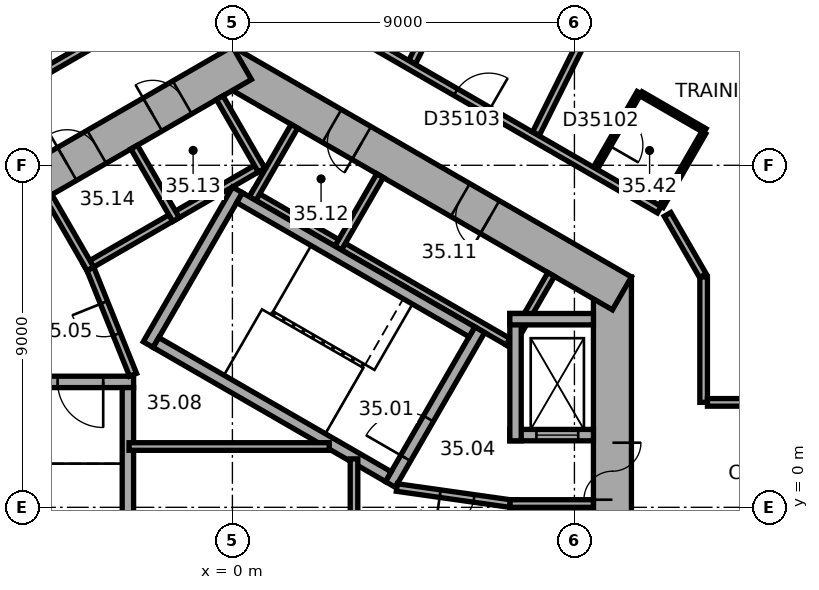
"""IFC4 building model, lengths in metres.
Left out: names, types, materials, properties, quantities, classifications, styles, units other than length and angle.
Written with IfcOpenShell. Run it as: python <this file> out.ifc"""

import sys

from ifc_helpers import new_model, si_unit, direction, frame, frame_2d, origin, place, context, subcontext, project, spatial, rectangle, extrude, element, fill, save


model = new_model("IFC4")
c1 = context("Model", 3, precision=1e-05, world=origin(), true_north=direction((0.0, 1.0)))
c2 = subcontext(c1, "Body", "Model", "MODEL_VIEW")
j1 = project(units=[si_unit("LENGTHUNIT", "METRE"), si_unit("PLANEANGLEUNIT", "RADIAN")], contexts=[c1])
p1 = place(None, origin())
s1 = spatial("IfcSite", under=j1, at=p1, CompositionType="ELEMENT")
p2 = place(p1, origin())
s2 = spatial("IfcBuilding", under=s1, at=p2, CompositionType="ELEMENT")
p3 = place(p2, frame((0.0, 0.0, 146.6)))
s3 = spatial("IfcBuildingStorey", under=s2, at=p3, CompositionType="ELEMENT", Elevation=146.6)
p4 = place(p3, frame((10.0, -6.062, 0.0), z_axis=(0.0, 0.0, 1.0), x_axis=(0.0, 1.0, 0.0)))
e1 = element("IfcWall", 1, at=p4, inside=s3, PredefinedType="SHEAR", context=c2, shape_type="SweptSolid", body=[
    extrude(rectangle(XDim=12.125, YDim=1.0, at=frame_2d((6.062, 0.0))), origin(), (0.0, 0.0, 1.0), 3.7),
])
p5 = place(p4, frame((6.262, 0.0, 0.0)))
e2 = element("IfcOpeningElement", 2, at=p5, cuts=e1, PredefinedType="OPENING", context=c2, shape_type="SweptSolid", body=[
    extrude(rectangle(XDim=1.5, YDim=2.1, at=frame_2d((0.75, 1.05))), frame((0.0, 0.51, 0.0), z_axis=(0.0, -1.0, 0.0), x_axis=(1.0, 0.0, 0.0)), (0.0, 0.0, 1.0), 1.02),
])
p6 = place(p4, frame((3.112, 0.0, 0.0)))
e3 = element("IfcOpeningElement", 3, at=p6, cuts=e1, PredefinedType="OPENING", context=c2, shape_type="SweptSolid", body=[
    extrude(rectangle(XDim=0.9, YDim=2.1, at=frame_2d((0.45, 1.05))), frame((0.0, 0.51, 0.0), z_axis=(0.0, -1.0, 0.0), x_axis=(1.0, 0.0, 0.0)), (0.0, 0.0, 1.0), 1.02),
])
p7 = place(p3, frame((10.25, 5.629, 0.0), z_axis=(0.0, 0.0, 1.0), x_axis=(-0.866022616891, 0.50000482701, 0.0)))
e4 = element("IfcWall", 4, at=p7, inside=s3, PredefinedType="SHEAR", context=c2, shape_type="SweptSolid", body=[
    extrude(rectangle(XDim=12.125, YDim=1.0, at=frame_2d((6.062, 0.0))), origin(), (0.0, 0.0, 1.0), 3.7),
])
p8 = place(p7, frame((4.012, 0.0, 0.0)))
e5 = element("IfcOpeningElement", 5, at=p8, cuts=e4, PredefinedType="OPENING", context=c2, shape_type="SweptSolid", body=[
    extrude(rectangle(XDim=0.9, YDim=2.1, at=frame_2d((0.45, 1.05))), frame((0.0, 0.51, 0.0), z_axis=(0.0, -1.0, 0.0), x_axis=(1.0, 0.0, 0.0)), (0.0, 0.0, 1.0), 1.02),
])
p9 = place(p7, frame((7.912, 0.0, 0.0)))
e6 = element("IfcOpeningElement", 6, at=p9, cuts=e4, PredefinedType="OPENING", context=c2, shape_type="SweptSolid", body=[
    extrude(rectangle(XDim=0.9, YDim=2.1, at=frame_2d((0.45, 1.05))), frame((0.0, 0.51, 0.0), z_axis=(0.0, -1.0, 0.0), x_axis=(1.0, 0.0, 0.0)), (0.0, 0.0, 1.0), 1.02),
])
p10 = place(p3, frame((0.25, 11.691, 0.0), z_axis=(0.0, 0.0, 1.0), x_axis=(-0.866022616891, -0.50000482701, 0.0)))
e7 = element("IfcWall", 7, at=p10, inside=s3, PredefinedType="SHEAR", context=c2, shape_type="SweptSolid", body=[
    extrude(rectangle(XDim=12.125, YDim=1.0, at=frame_2d((6.062, 0.0))), origin(), (0.0, 0.0, 1.0), 3.7),
])
p11 = place(p10, frame((6.262, 0.0, 0.0)))
e8 = element("IfcOpeningElement", 8, at=p11, cuts=e7, PredefinedType="OPENING", context=c2, shape_type="SweptSolid", body=[
    extrude(rectangle(XDim=1.5, YDim=2.1, at=frame_2d((0.75, 1.05))), frame((0.0, 0.51, 0.0), z_axis=(0.0, -1.0, 0.0), x_axis=(1.0, 0.0, 0.0)), (0.0, 0.0, 1.0), 1.02),
])
p12 = place(p10, frame((1.812, 0.0, 0.0)))
e9 = element("IfcOpeningElement", 9, at=p12, cuts=e7, PredefinedType="OPENING", context=c2, shape_type="SweptSolid", body=[
    extrude(rectangle(XDim=0.9, YDim=2.1, at=frame_2d((0.45, 1.05))), frame((0.0, 0.51, 0.0), z_axis=(0.0, -1.0, 0.0), x_axis=(1.0, 0.0, 0.0)), (0.0, 0.0, 1.0), 1.02),
])
p13 = place(p10, frame((4.412, 0.0, 0.0)))
e10 = element("IfcOpeningElement", 10, at=p13, cuts=e7, PredefinedType="OPENING", context=c2, shape_type="SweptSolid", body=[
    extrude(rectangle(XDim=0.9, YDim=2.1, at=frame_2d((0.45, 1.05))), frame((0.0, 0.51, 0.0), z_axis=(0.0, -1.0, 0.0), x_axis=(1.0, 0.0, 0.0)), (0.0, 0.0, 1.0), 1.02),
])
p14 = place(p3, frame((7.4, -5.2, 0.0), z_axis=(0.0, 0.0, 1.0), x_axis=(0.0, 1.0, 0.0)))
e11 = element("IfcWall", 11, at=p14, inside=s3, PredefinedType="PARTITIONING", context=c2, shape_type="SweptSolid", body=[
    extrude(rectangle(XDim=5.4, YDim=0.2, at=frame_2d((2.7, 0.0))), origin(), (0.0, 0.0, 1.0), 3.42),
])
p15 = place(p3, frame((7.3, 0.1, 0.0), z_axis=(0.0, 0.0, 1.0), x_axis=(1.0, 0.0, 0.0)))
e12 = element("IfcWall", 12, at=p15, inside=s3, PredefinedType="PARTITIONING", context=c2, shape_type="SweptSolid", body=[
    extrude(rectangle(XDim=2.2, YDim=0.2, at=frame_2d((1.1, 0.0))), origin(), (0.0, 0.0, 1.0), 3.42),
])
p16 = place(p3, frame((7.424, 4.259, 0.0), z_axis=(0.0, 0.0, 1.0), x_axis=(-0.866026010844, 0.49999894854, 0.0)))
e13 = element("IfcWall", 13, at=p16, inside=s3, PredefinedType="PARTITIONING", context=c2, shape_type="SweptSolid", body=[
    extrude(rectangle(XDim=8.0, YDim=0.2, at=frame_2d((4.0, 0.0))), origin(), (0.0, 0.0, 1.0), 3.42),
])
for number, where, z_axis, x_axis in (
    (14, (7.287, 4.222, 0.0), (0.0, 0.0, 1.0), (0.5, 0.866, 0.0)),
    (15, (2.784, 6.822, 0.0), (0.0, 0.0, 1.0), (0.5, 0.866, 0.0)),
    (16, (0.532, 8.122, 0.0), (0.0, 0.0, 1.0), (0.5, 0.866, 0.0)),
):
    element("IfcWall", number, at=place(p3, frame(where, z_axis=z_axis, x_axis=x_axis)), inside=s3, PredefinedType="PARTITIONING", context=c2, shape_type="SweptSolid", body=[
        extrude(rectangle(XDim=2.2, YDim=0.2, at=frame_2d((1.1, 0.0))), origin(), (0.0, 0.0, 1.0), 3.42),
    ])
p17 = place(p3, frame((0.803, 9.009, 0.0), z_axis=(0.0, 0.0, 1.0), x_axis=(-0.866028230842, -0.499995103361, 0.0)))
e17 = element("IfcWall", 17, at=p17, inside=s3, PredefinedType="PARTITIONING", context=c2, shape_type="SweptSolid", body=[
    extrude(rectangle(XDim=5.4, YDim=0.2, at=frame_2d((2.7, 0.0))), origin(), (0.0, 0.0, 1.0), 3.42),
])
p18 = place(p3, frame((0.767, 8.872, 0.0), z_axis=(0.0, 0.0, 1.0), x_axis=(-0.499994660107, 0.866028486751, 0.0)))
e18 = element("IfcWall", 18, at=p18, inside=s3, PredefinedType="PARTITIONING", context=c2, shape_type="SweptSolid", body=[
    extrude(rectangle(XDim=2.2, YDim=0.2, at=frame_2d((1.1, 0.0))), origin(), (0.0, 0.0, 1.0), 3.42),
])
for number, where, z_axis, x_axis in (
    (19, (-1.485, 7.572, 0.0), (0.0, 0.0, 1.0), (-0.5, 0.866, 0.0)),
    (20, (-3.737, 6.272, 0.0), (0.0, 0.0, 1.0), (-0.5, 0.866, 0.0)),
):
    element("IfcWall", number, at=place(p3, frame(where, z_axis=z_axis, x_axis=x_axis)), inside=s3, PredefinedType="PARTITIONING", context=c2, shape_type="SweptSolid", body=[
        extrude(rectangle(XDim=2.2, YDim=0.2, at=frame_2d((1.1, 0.0))), origin(), (0.0, 0.0, 1.0), 3.42),
    ])
p19 = place(p3, frame((4.158, 0.602, 0.0), z_axis=(0.0, 0.0, 1.0), x_axis=(0.499977259774, 0.866038532462, 0.0)))
e21 = element("IfcWall", 21, at=p19, inside=s3, PredefinedType="SHEAR", context=c2, shape_type="SweptSolid", body=[
    extrude(rectangle(XDim=4.7, YDim=0.3, at=frame_2d((2.35, 0.0))), origin(), (0.0, 0.0, 1.0), 3.42),
])
p20 = place(p19, frame((0.8, 0.0, 0.0)))
e22 = element("IfcOpeningElement", 22, at=p20, cuts=e21, PredefinedType="OPENING", context=c2, shape_type="SweptSolid", body=[
    extrude(rectangle(XDim=1.2, YDim=2.1, at=frame_2d((0.6, 1.05))), frame((0.0, 0.16, 0.0), z_axis=(0.0, -1.0, 0.0), x_axis=(1.0, 0.0, 0.0)), (0.0, 0.0, 1.0), 0.32),
])
p21 = place(p3, frame((-2.216, 4.282, 0.0), z_axis=(0.0, 0.0, 1.0), x_axis=(0.499977259774, 0.866038532462, 0.0)))
e23 = element("IfcWall", 23, at=p21, inside=s3, PredefinedType="SHEAR", context=c2, shape_type="SweptSolid", body=[
    extrude(rectangle(XDim=4.7, YDim=0.3, at=frame_2d((2.35, 0.0))), origin(), (0.0, 0.0, 1.0), 3.42),
])
for number, where, z_axis, x_axis in (
    (24, (4.103, 0.807, 0.0), (0.0, 0.0, 1.0), (-0.866, 0.5, 0.0)),
    (25, (6.303, 4.617, 0.0), (0.0, 0.0, 1.0), (-0.866, 0.5, 0.0)),
):
    element("IfcWall", number, at=place(p3, frame(where, z_axis=z_axis, x_axis=x_axis)), inside=s3, PredefinedType="SHEAR", context=c2, shape_type="SweptSolid", body=[
        extrude(rectangle(XDim=7.06, YDim=0.3, at=frame_2d((3.53, 0.0))), origin(), (0.0, 0.0, 1.0), 3.42),
    ])
p22 = place(p3, frame((-2.6, 3.3, 0.0), z_axis=(0.0, 0.0, 1.0), x_axis=(-1.0, 0.0, 0.0)))
e26 = element("IfcWall", 26, at=p22, inside=s3, PredefinedType="SHEAR", context=c2, shape_type="SweptSolid", body=[
    extrude(rectangle(XDim=4.7, YDim=0.3, at=frame_2d((2.35, 0.0))), origin(), (0.0, 0.0, 1.0), 3.42),
])
p23 = place(p22, frame((0.8, 0.0, 0.0)))
e27 = element("IfcOpeningElement", 27, at=p23, cuts=e26, PredefinedType="OPENING", context=c2, shape_type="SweptSolid", body=[
    extrude(rectangle(XDim=1.2, YDim=2.1, at=frame_2d((0.6, 1.05))), frame((0.0, 0.16, 0.0), z_axis=(0.0, -1.0, 0.0), x_axis=(1.0, 0.0, 0.0)), (0.0, 0.0, 1.0), 0.32),
])
p24 = place(p3, frame((-2.75, 3.15, 0.0), z_axis=(0.0, 0.0, 1.0), x_axis=(0.0, -1.0, 0.0)))
e28 = element("IfcWall", 28, at=p24, inside=s3, PredefinedType="SHEAR", context=c2, shape_type="SweptSolid", body=[
    extrude(rectangle(XDim=7.06, YDim=0.3, at=frame_2d((3.53, 0.0))), origin(), (0.0, 0.0, 1.0), 3.42),
])
p25 = place(p3, frame((7.3, 1.9, 0.0), z_axis=(0.0, 0.0, 1.0), x_axis=(1.0, 0.0, 0.0)))
e29 = element("IfcWall", 29, at=p25, inside=s3, PredefinedType="SHEAR", context=c2, shape_type="SweptSolid", body=[
    extrude(rectangle(XDim=2.2, YDim=0.3, at=frame_2d((1.1, 0.0))), origin(), (0.0, 0.0, 1.0), 3.42),
])
p26 = place(p25, frame((0.7, 0.0, 0.0)))
e30 = element("IfcOpeningElement", 30, at=p26, cuts=e29, PredefinedType="OPENING", context=c2, shape_type="SweptSolid", body=[
    extrude(rectangle(XDim=1.1, YDim=2.1, at=frame_2d((0.55, 1.05))), frame((0.0, 0.16, 0.0), z_axis=(0.0, -1.0, 0.0), x_axis=(1.0, 0.0, 0.0)), (0.0, 0.0, 1.0), 0.32),
])
p27 = place(p3, frame((7.45, 1.75, 0.0), z_axis=(0.0, 0.0, 1.0), x_axis=(0.0, 1.0, 0.0)))
e31 = element("IfcWall", 31, at=p27, inside=s3, PredefinedType="SHEAR", context=c2, shape_type="SweptSolid", body=[
    extrude(rectangle(XDim=3.35, YDim=0.3, at=frame_2d((1.675, 0.0))), origin(), (0.0, 0.0, 1.0), 3.42),
])
p28 = place(p3, frame((7.3, 4.95, 0.0), z_axis=(0.0, 0.0, 1.0), x_axis=(1.0, 0.0, 0.0)))
e32 = element("IfcWall", 32, at=p28, inside=s3, PredefinedType="SHEAR", context=c2, shape_type="SweptSolid", body=[
    extrude(rectangle(XDim=2.2, YDim=0.3, at=frame_2d((1.1, 0.0))), origin(), (0.0, 0.0, 1.0), 3.42),
])
p29 = place(p3, frame((4.327, 0.521, 0.0), z_axis=(0.0, 0.0, 1.0), x_axis=(0.990124376366, -0.14019172346, 0.0)))
e33 = element("IfcWall", 33, at=p29, inside=s3, PredefinedType="PARTITIONING", context=c2, shape_type="SweptSolid", body=[
    extrude(rectangle(XDim=3.002, YDim=0.2, at=frame_2d((1.501, 0.0))), origin(), (0.0, 0.0, 1.0), 3.42),
])
p30 = place(p29, frame((1.15, 0.0, 0.0)))
e34 = element("IfcOpeningElement", 34, at=p30, cuts=e33, PredefinedType="OPENING", context=c2, shape_type="SweptSolid", body=[
    extrude(rectangle(XDim=0.9, YDim=2.1, at=frame_2d((0.45, 1.05))), frame((0.0, 0.11, 0.0), z_axis=(0.0, -1.0, 0.0), x_axis=(1.0, 0.0, 0.0)), (0.0, 0.0, 1.0), 0.22),
])
p31 = place(p3, frame((-2.615, 3.487, 0.0), z_axis=(0.0, 0.0, 1.0), x_axis=(-0.373576831041, 0.92759924068, 0.0)))
e35 = element("IfcWall", 35, at=p31, inside=s3, PredefinedType="PARTITIONING", context=c2, shape_type="SweptSolid", body=[
    extrude(rectangle(XDim=3.002, YDim=0.2, at=frame_2d((1.501, 0.0))), origin(), (0.0, 0.0, 1.0), 3.42),
])
p32 = place(p31, frame((1.15, 0.0, 0.0)))
e36 = element("IfcOpeningElement", 36, at=p32, cuts=e35, PredefinedType="OPENING", context=c2, shape_type="SweptSolid", body=[
    extrude(rectangle(XDim=0.9, YDim=2.1, at=frame_2d((0.45, 1.05))), frame((0.0, 0.11, 0.0), z_axis=(0.0, -1.0, 0.0), x_axis=(1.0, 0.0, 0.0)), (0.0, 0.0, 1.0), 0.22),
])
p33 = place(p3, frame((-2.72, 1.6, 0.0), z_axis=(0.0, 0.0, 1.0), x_axis=(1.0, 0.0, 0.0)))
e37 = element("IfcWall", 37, at=p33, inside=s3, PredefinedType="PARTITIONING", context=c2, shape_type="SweptSolid", body=[
    extrude(rectangle(XDim=5.269, YDim=0.2, at=frame_2d((2.634, 0.0))), origin(), (0.0, 0.0, 1.0), 3.42),
])
p34 = place(p3, frame((3.2, -1.275, 0.0), z_axis=(0.0, 0.0, 1.0), x_axis=(0.0, 1.0, 0.0)))
e38 = element("IfcWall", 38, at=p34, inside=s3, PredefinedType="PARTITIONING", context=c2, shape_type="SweptSolid", body=[
    extrude(rectangle(XDim=2.549, YDim=0.2, at=frame_2d((1.275, 0.0))), origin(), (0.0, 0.0, 1.0), 3.42),
])
p35 = place(p3, frame((-1.167, 13.645, 0.0), z_axis=(0.0, 0.0, 1.0), x_axis=(-0.866034830959, -0.499983671299, 0.0)))
e39 = element("IfcWall", 39, at=p35, inside=s3, PredefinedType="PARTITIONING", context=c2, shape_type="SweptSolid", body=[
    extrude(rectangle(XDim=4.719, YDim=0.2, at=frame_2d((2.36, 0.0))), origin(), (0.0, 0.0, 1.0), 3.42),
])
p36 = place(p3, frame((8.37, 19.013, 0.0), z_axis=(0.0, 0.0, 1.0), x_axis=(-0.446183598632, -0.894941448538, 0.0)))
e40 = element("IfcWall", 40, at=p36, inside=s3, PredefinedType="PARTITIONING", context=c2, shape_type="SweptSolid", body=[
    extrude(rectangle(XDim=8.156, YDim=0.2, at=frame_2d((4.078, 0.0))), origin(), (0.0, 0.0, 1.0), 3.42),
])
p37 = place(p3, frame((9.552, 8.919, 0.0), z_axis=(0.0, 0.0, 1.0), x_axis=(0.499952165731, 0.866053019151, 0.0)))
e41 = element("IfcWall", 41, at=p37, inside=s3, PredefinedType="PARTITIONING", context=c2, shape_type="SweptSolid", body=[
    extrude(rectangle(XDim=2.3, YDim=0.12, at=frame_2d((1.15, 0.0))), origin(), (0.0, 0.0, 1.0), 3.42),
])
p38 = place(p37, frame((0.7, 0.0, 0.0)))
e42 = element("IfcOpeningElement", 42, at=p38, cuts=e41, PredefinedType="OPENING", context=c2, shape_type="SweptSolid", body=[
    extrude(rectangle(XDim=0.9, YDim=2.1, at=frame_2d((0.45, 1.05))), frame((0.0, 0.07, 0.0), z_axis=(0.0, -1.0, 0.0), x_axis=(1.0, 0.0, 0.0)), (0.0, 0.0, 1.0), 0.14),
])
p39 = place(p3, frame((10.753, 10.881, 0.0), z_axis=(0.0, 0.0, 1.0), x_axis=(0.866043088465, -0.499969367985, 0.0)))
e43 = element("IfcWall", 43, at=p39, inside=s3, PredefinedType="PARTITIONING", context=c2, shape_type="SweptSolid", body=[
    extrude(rectangle(XDim=1.94, YDim=0.12, at=frame_2d((0.97, 0.0))), origin(), (0.0, 0.0, 1.0), 3.42),
])
p40 = place(p3, frame((11.233, 7.833, 0.0), z_axis=(0.0, 0.0, 1.0), x_axis=(-0.866021713988, 0.50000639086, 0.0)))
e44 = element("IfcWall", 44, at=p40, inside=s3, PredefinedType="PARTITIONING", context=c2, shape_type="SweptSolid", body=[
    extrude(rectangle(XDim=11.834, YDim=0.2, at=frame_2d((5.917, 0.0))), origin(), (0.0, 0.0, 1.0), 3.42),
])
p41 = place(p40, frame((5.185, 0.0, 0.0)))
e45 = element("IfcOpeningElement", 45, at=p41, cuts=e44, PredefinedType="OPENING", context=c2, shape_type="SweptSolid", body=[
    extrude(rectangle(XDim=1.0, YDim=2.1, at=frame_2d((0.5, 1.05))), frame((0.0, 0.11, 0.0), z_axis=(0.0, -1.0, 0.0), x_axis=(1.0, 0.0, 0.0)), (0.0, 0.0, 1.0), 0.22),
])
p42 = place(p3, frame((11.73, 17.338, 0.0), z_axis=(0.0, 0.0, 1.0), x_axis=(-0.446165200553, -0.894950620881, 0.0)))
e46 = element("IfcWall", 46, at=p42, inside=s3, PredefinedType="PARTITIONING", context=c2, shape_type="SweptSolid", body=[
    extrude(rectangle(XDim=8.386, YDim=0.2, at=frame_2d((4.193, 0.0))), origin(), (0.0, 0.0, 1.0), 2.87),
])
p43 = place(p3, frame((12.38, 6.097, 0.0), z_axis=(0.0, 0.0, 1.0), x_axis=(-0.499964847546, 0.866045698112, 0.0)))
e47 = element("IfcWall", 47, at=p43, inside=s3, PredefinedType="PARTITIONING", context=c2, shape_type="SweptSolid", body=[
    extrude(rectangle(XDim=1.86, YDim=0.2, at=frame_2d((0.93, 0.0))), origin(), (0.0, 0.0, 1.0), 3.42),
])
p44 = place(p3, frame((12.4, 2.761, 0.0), z_axis=(0.0, 0.0, 1.0), x_axis=(0.0, 1.0, 0.0)))
e48 = element("IfcWall", 48, at=p44, inside=s3, PredefinedType="PARTITIONING", context=c2, shape_type="SweptSolid", body=[
    extrude(rectangle(XDim=3.301, YDim=0.2, at=frame_2d((1.65, 0.0))), origin(), (0.0, 0.0, 1.0), 3.42),
])
p45 = place(p3, frame((12.404, 9.859, 0.0), z_axis=(0.0, 0.0, 1.0), x_axis=(-0.500030632641, -0.866007717299, 0.0)))
e49 = element("IfcWall", 49, at=p45, inside=s3, PredefinedType="PARTITIONING", context=c2, shape_type="SweptSolid", body=[
    extrude(rectangle(XDim=2.24, YDim=0.12, at=frame_2d((1.12, 0.0))), origin(), (0.0, 0.0, 1.0), 3.42),
])
p46 = place(p3, frame((20.75, 2.761, 0.0), z_axis=(0.0, 0.0, 1.0), x_axis=(-1.0, 0.0, 0.0)))
e50 = element("IfcWall", 50, at=p46, inside=s3, PredefinedType="PARTITIONING", context=c2, shape_type="SweptSolid", body=[
    extrude(rectangle(XDim=8.25, YDim=0.2, at=frame_2d((4.125, 0.0))), origin(), (0.0, 0.0, 1.0), 3.42),
])
p47 = place(p46, frame((3.625, 0.0, 0.0)))
e51 = element("IfcOpeningElement", 51, at=p47, cuts=e50, PredefinedType="OPENING", context=c2, shape_type="SweptSolid", body=[
    extrude(rectangle(XDim=1.0, YDim=2.1, at=frame_2d((0.5, 1.05))), frame((0.0, 0.11, 0.0), z_axis=(0.0, -1.0, 0.0), x_axis=(1.0, 0.0, 0.0)), (0.0, 0.0, 1.0), 0.22),
])
p48 = place(p5, origin())
e52 = element("IfcDoor", 52, at=p48, inside=s3, OperationType="DOUBLE_DOOR_SINGLE_SWING", PredefinedType="DOOR", context=c2, shape_type="SweptSolid", body=[
    extrude(rectangle(XDim=1.5, YDim=2.1, at=frame_2d((0.75, 1.05))), frame((0.0, 0.025, 0.0), z_axis=(0.0, -1.0, 0.0), x_axis=(1.0, 0.0, 0.0)), (0.0, 0.0, 1.0), 0.05),
])
fill(e2, e52)
p49 = place(p20, origin())
e53 = element("IfcDoor", 53, at=p49, inside=s3, OperationType="SINGLE_SWING_RIGHT", PredefinedType="DOOR", context=c2, shape_type="SweptSolid", body=[
    extrude(rectangle(XDim=1.2, YDim=2.1, at=frame_2d((0.6, 1.05))), frame((0.0, 0.025, 0.0), z_axis=(0.0, -1.0, 0.0), x_axis=(1.0, 0.0, 0.0)), (0.0, 0.0, 1.0), 0.05),
])
fill(e22, e53)
p50 = place(p23, origin())
e54 = element("IfcDoor", 54, at=p50, inside=s3, OperationType="SINGLE_SWING_RIGHT", PredefinedType="DOOR", context=c2, shape_type="SweptSolid", body=[
    extrude(rectangle(XDim=1.2, YDim=2.1, at=frame_2d((0.6, 1.05))), frame((0.0, 0.025, 0.0), z_axis=(0.0, -1.0, 0.0), x_axis=(1.0, 0.0, 0.0)), (0.0, 0.0, 1.0), 0.05),
])
fill(e27, e54)
p51 = place(p30, origin())
e55 = element("IfcDoor", 55, at=p51, inside=s3, OperationType="SINGLE_SWING_LEFT", PredefinedType="DOOR", context=c2, shape_type="SweptSolid", body=[
    extrude(rectangle(XDim=0.9, YDim=2.1, at=frame_2d((0.45, 1.05))), frame((0.0, 0.025, 0.0), z_axis=(0.0, -1.0, 0.0), x_axis=(1.0, 0.0, 0.0)), (0.0, 0.0, 1.0), 0.05),
])
fill(e34, e55)
p52 = place(p32, origin())
e56 = element("IfcDoor", 56, at=p52, inside=s3, OperationType="SINGLE_SWING_LEFT", PredefinedType="DOOR", context=c2, shape_type="SweptSolid", body=[
    extrude(rectangle(XDim=0.9, YDim=2.1, at=frame_2d((0.45, 1.05))), frame((0.0, 0.025, 0.0), z_axis=(0.0, -1.0, 0.0), x_axis=(1.0, 0.0, 0.0)), (0.0, 0.0, 1.0), 0.05),
])
fill(e36, e56)
p53 = place(p8, origin())
e57 = element("IfcDoor", 57, at=p53, inside=s3, OperationType="SINGLE_SWING_LEFT", PredefinedType="DOOR", context=c2, shape_type="SweptSolid", body=[
    extrude(rectangle(XDim=0.9, YDim=2.1, at=frame_2d((0.45, 1.05))), frame((0.0, 0.025, 0.0), z_axis=(0.0, -1.0, 0.0), x_axis=(1.0, 0.0, 0.0)), (0.0, 0.0, 1.0), 0.05),
])
fill(e5, e57)
p54 = place(p9, origin())
e58 = element("IfcDoor", 58, at=p54, inside=s3, OperationType="SINGLE_SWING_LEFT", PredefinedType="DOOR", context=c2, shape_type="SweptSolid", body=[
    extrude(rectangle(XDim=0.9, YDim=2.1, at=frame_2d((0.45, 1.05))), frame((0.0, 0.025, 0.0), z_axis=(0.0, -1.0, 0.0), x_axis=(1.0, 0.0, 0.0)), (0.0, 0.0, 1.0), 0.05),
])
fill(e6, e58)
p55 = place(p12, origin())
e59 = element("IfcDoor", 59, at=p55, inside=s3, OperationType="SINGLE_SWING_LEFT", PredefinedType="DOOR", context=c2, shape_type="SweptSolid", body=[
    extrude(rectangle(XDim=0.9, YDim=2.1, at=frame_2d((0.45, 1.05))), frame((0.0, 0.025, 0.0), z_axis=(0.0, -1.0, 0.0), x_axis=(1.0, 0.0, 0.0)), (0.0, 0.0, 1.0), 0.05),
])
fill(e9, e59)
p56 = place(p13, origin())
e60 = element("IfcDoor", 60, at=p56, inside=s3, OperationType="SINGLE_SWING_LEFT", PredefinedType="DOOR", context=c2, shape_type="SweptSolid", body=[
    extrude(rectangle(XDim=0.9, YDim=2.1, at=frame_2d((0.45, 1.05))), frame((0.0, 0.025, 0.0), z_axis=(0.0, -1.0, 0.0), x_axis=(1.0, 0.0, 0.0)), (0.0, 0.0, 1.0), 0.05),
])
fill(e10, e60)
p57 = place(p26, origin())
e61 = element("IfcDoor", 61, at=p57, inside=s3, OperationType="DOUBLE_DOOR_SLIDING", PredefinedType="DOOR", context=c2, shape_type="SweptSolid", body=[
    extrude(rectangle(XDim=1.1, YDim=2.1, at=frame_2d((0.55, 1.05))), frame((0.0, 0.025, 0.0), z_axis=(0.0, -1.0, 0.0), x_axis=(1.0, 0.0, 0.0)), (0.0, 0.0, 1.0), 0.05),
])
fill(e30, e61)
p58 = place(p38, origin())
e62 = element("IfcDoor", 62, at=p58, inside=s3, OperationType="SINGLE_SWING_LEFT", PredefinedType="DOOR", context=c2, shape_type="SweptSolid", body=[
    extrude(rectangle(XDim=0.9, YDim=2.1, at=frame_2d((0.45, 1.05))), frame((0.0, 0.025, 0.0), z_axis=(0.0, -1.0, 0.0), x_axis=(1.0, 0.0, 0.0)), (0.0, 0.0, 1.0), 0.05),
])
fill(e42, e62)
p59 = place(p41, origin())
e63 = element("IfcDoor", 63, at=p59, inside=s3, OperationType="SINGLE_SWING_LEFT", PredefinedType="DOOR", context=c2, shape_type="SweptSolid", body=[
    extrude(rectangle(XDim=1.0, YDim=2.1, at=frame_2d((0.5, 1.05))), frame((0.0, 0.025, 0.0), z_axis=(0.0, -1.0, 0.0), x_axis=(1.0, 0.0, 0.0)), (0.0, 0.0, 1.0), 0.05),
])
fill(e45, e63)
save(model, sys.argv[1])
